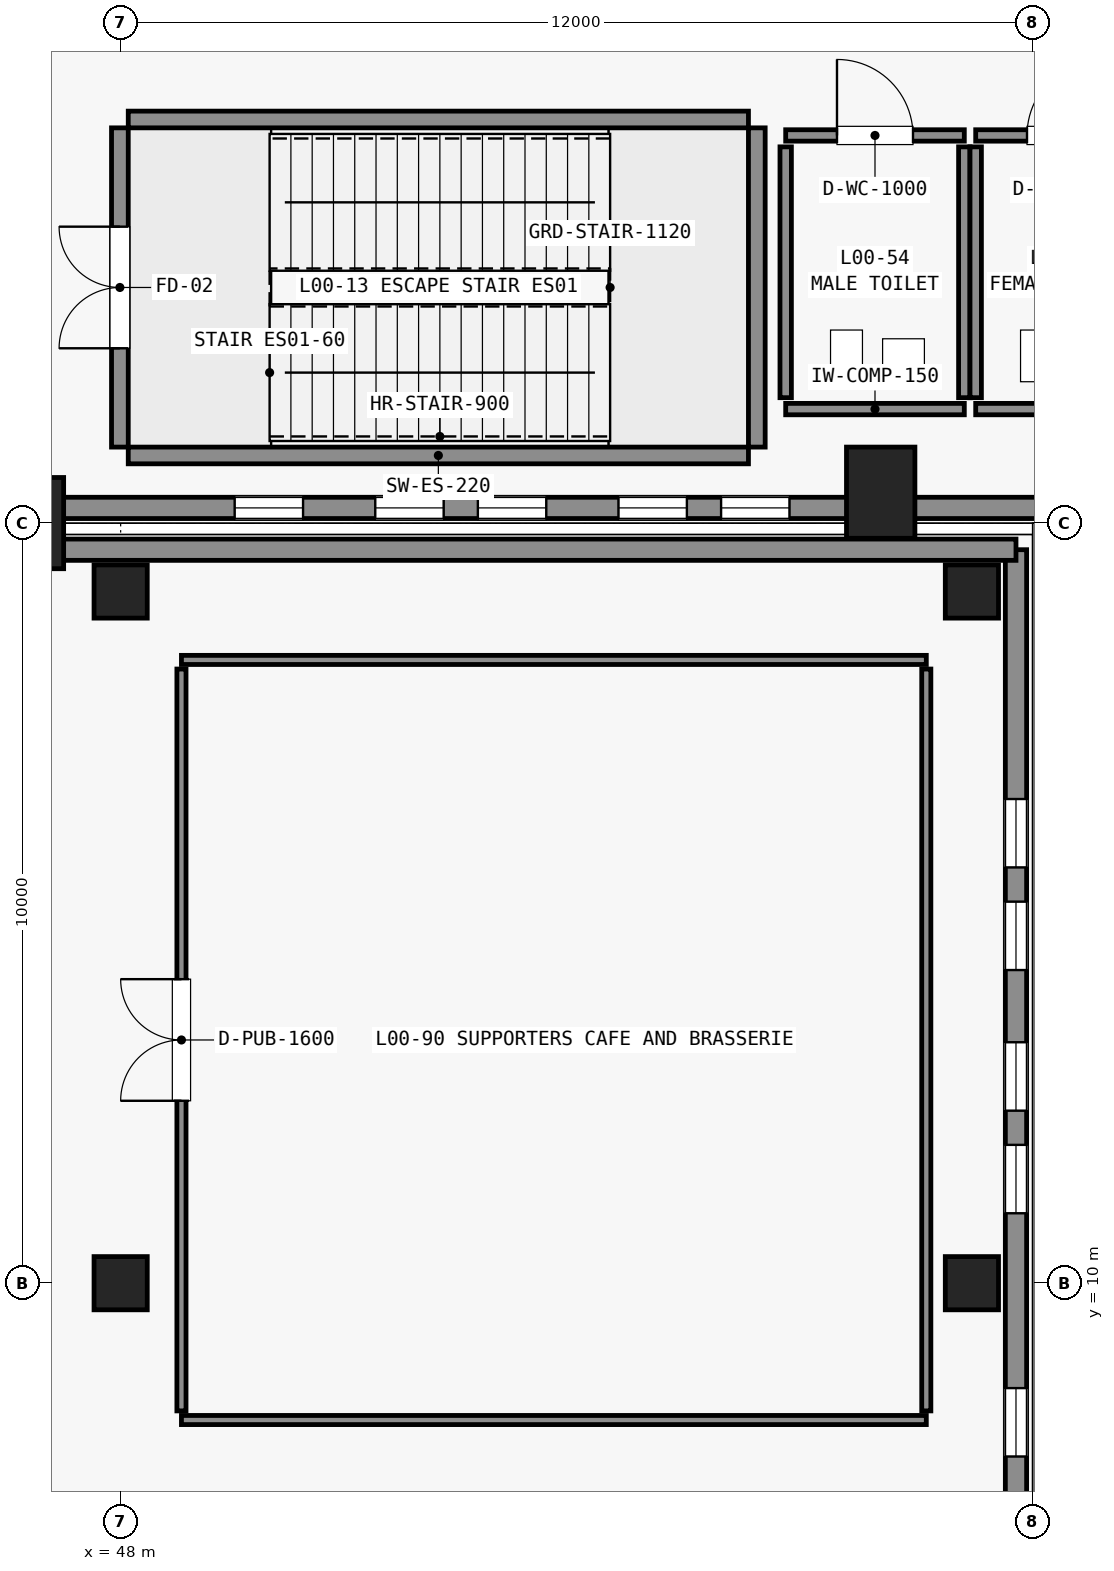
"""IFC4 building model, lengths in metres.
Left out: names, types, materials, properties, quantities, classifications, styles, units other than length and angle.
Written with IfcOpenShell. Run it as: python <this file> out.ifc"""

import sys

from ifc_helpers import new_model, si_unit, direction, frame, frame_2d, origin, origin_2d, place, context, subcontext, project, spatial, rectangle, extrude, element, fill, save


model = new_model("IFC4")
c1 = context("Model", 3, precision=1e-05, world=origin(), true_north=direction((0.0, 1.0)))
c2 = subcontext(c1, "Body", "Model", "MODEL_VIEW")
j1 = project(units=[si_unit("LENGTHUNIT", "METRE"), si_unit("PLANEANGLEUNIT", "RADIAN")], contexts=[c1])
p1 = place(None, origin())
s1 = spatial("IfcSite", under=j1, at=p1, CompositionType="ELEMENT")
p2 = place(p1, origin())
s2 = spatial("IfcBuilding", under=s1, at=p2, CompositionType="ELEMENT")
p3 = place(p2, origin())
s3 = spatial("IfcBuildingStorey", under=s2, at=p3, CompositionType="ELEMENT", Elevation=0.0)
p4 = place(p3, frame((58.0, 20.4, 0.0), z_axis=(0.0, 0.0, 1.0), x_axis=(1.0, 0.0, 0.0)))
e1 = element("IfcColumn", 1, at=p4, inside=s3, PredefinedType="PILASTER", context=c2, shape_type="SweptSolid", body=[
    extrude(rectangle(XDim=0.9, YDim=1.2, at=origin_2d()), origin(), (0.0, 0.0, 1.0), 6.0),
])
p5 = place(p3, frame((46.8, 20.0, -0.45), z_axis=(0.0, 0.0, 1.0), x_axis=(1.0, 0.0, 0.0)))
e2 = element("IfcColumn", 2, at=p5, inside=s3, PredefinedType="PILASTER", context=c2, shape_type="SweptSolid", body=[
    extrude(rectangle(XDim=0.9, YDim=1.2, at=origin_2d()), origin(), (0.0, 0.0, 1.0), 6.45),
])
for number, where, z_axis, x_axis in (
    (3, (48.0, 10.0, -0.45), (0.0, 0.0, 1.0), (1.0, 0.0, 0.0)),
    (4, (48.0, 19.1, -0.45), (0.0, 0.0, 1.0), (1.0, 0.0, 0.0)),
    (5, (59.2, 10.0, -0.45), (0.0, 0.0, 1.0), (1.0, 0.0, 0.0)),
    (6, (59.2, 19.1, -0.45), (0.0, 0.0, 1.0), (1.0, 0.0, 0.0)),
):
    element("IfcColumn", number, at=place(p3, frame(where, z_axis=z_axis, x_axis=x_axis)), inside=s3, PredefinedType="COLUMN", context=c2, shape_type="SweptSolid", body=[
        extrude(rectangle(XDim=0.7, YDim=0.7, at=origin_2d()), origin(), (0.0, 0.0, 1.0), 6.45),
    ])
p6 = place(p3, frame((47.05, 20.2, 0.0), z_axis=(0.0, 0.0, 1.0), x_axis=(1.0, 0.0, 0.0)))
e7 = element("IfcWall", 7, at=p6, inside=s3, PredefinedType="STANDARD", context=c2, shape_type="SweptSolid", body=[
    extrude(rectangle(XDim=26.93, YDim=0.28, at=frame_2d((13.465, 0.0))), origin(), (0.0, 0.0, 1.0), 5.64),
])
p7 = place(p6, frame((18.8, 0.0, 0.0)))
e8 = element("IfcOpeningElement", 8, at=p7, cuts=e7, PredefinedType="OPENING", context=c2, shape_type="SweptSolid", body=[
    extrude(rectangle(XDim=2.4, YDim=2.5, at=frame_2d((1.2, 1.25))), frame((0.0, 0.15, 0.0), z_axis=(0.0, -1.0, 0.0), x_axis=(1.0, 0.0, 0.0)), (0.0, 0.0, 1.0), 0.3),
])
p8 = place(p6, frame((2.45, 0.0, 0.95)))
e9 = element("IfcOpeningElement", 9, at=p8, cuts=e7, PredefinedType="OPENING", context=c2, shape_type="SweptSolid", body=[
    extrude(rectangle(XDim=0.9, YDim=2.85, at=frame_2d((0.45, 1.425))), frame((0.0, 0.15, 0.0), z_axis=(0.0, -1.0, 0.0), x_axis=(1.0, 0.0, 0.0)), (0.0, 0.0, 1.0), 0.3),
])
p9 = place(p6, frame((4.3, 0.0, 0.95)))
e10 = element("IfcOpeningElement", 10, at=p9, cuts=e7, PredefinedType="OPENING", context=c2, shape_type="SweptSolid", body=[
    extrude(rectangle(XDim=0.9, YDim=2.85, at=frame_2d((0.45, 1.425))), frame((0.0, 0.15, 0.0), z_axis=(0.0, -1.0, 0.0), x_axis=(1.0, 0.0, 0.0)), (0.0, 0.0, 1.0), 0.3),
])
p10 = place(p6, frame((5.65, 0.0, 0.95)))
e11 = element("IfcOpeningElement", 11, at=p10, cuts=e7, PredefinedType="OPENING", context=c2, shape_type="SweptSolid", body=[
    extrude(rectangle(XDim=0.9, YDim=2.85, at=frame_2d((0.45, 1.425))), frame((0.0, 0.15, 0.0), z_axis=(0.0, -1.0, 0.0), x_axis=(1.0, 0.0, 0.0)), (0.0, 0.0, 1.0), 0.3),
])
p11 = place(p6, frame((7.5, 0.0, 0.95)))
e12 = element("IfcOpeningElement", 12, at=p11, cuts=e7, PredefinedType="OPENING", context=c2, shape_type="SweptSolid", body=[
    extrude(rectangle(XDim=0.9, YDim=2.85, at=frame_2d((0.45, 1.425))), frame((0.0, 0.15, 0.0), z_axis=(0.0, -1.0, 0.0), x_axis=(1.0, 0.0, 0.0)), (0.0, 0.0, 1.0), 0.3),
])
p12 = place(p6, frame((8.85, 0.0, 0.95)))
e13 = element("IfcOpeningElement", 13, at=p12, cuts=e7, PredefinedType="OPENING", context=c2, shape_type="SweptSolid", body=[
    extrude(rectangle(XDim=0.9, YDim=2.85, at=frame_2d((0.45, 1.425))), frame((0.0, 0.15, 0.0), z_axis=(0.0, -1.0, 0.0), x_axis=(1.0, 0.0, 0.0)), (0.0, 0.0, 1.0), 0.3),
])
p13 = place(p6, frame((13.9, 0.0, 0.95)))
e14 = element("IfcOpeningElement", 14, at=p13, cuts=e7, PredefinedType="OPENING", context=c2, shape_type="SweptSolid", body=[
    extrude(rectangle(XDim=0.9, YDim=2.85, at=frame_2d((0.45, 1.425))), frame((0.0, 0.15, 0.0), z_axis=(0.0, -1.0, 0.0), x_axis=(1.0, 0.0, 0.0)), (0.0, 0.0, 1.0), 0.3),
])
p14 = place(p6, frame((15.25, 0.0, 0.95)))
e15 = element("IfcOpeningElement", 15, at=p14, cuts=e7, PredefinedType="OPENING", context=c2, shape_type="SweptSolid", body=[
    extrude(rectangle(XDim=0.9, YDim=2.85, at=frame_2d((0.45, 1.425))), frame((0.0, 0.15, 0.0), z_axis=(0.0, -1.0, 0.0), x_axis=(1.0, 0.0, 0.0)), (0.0, 0.0, 1.0), 0.3),
])
p15 = place(p6, frame((17.1, 0.0, 0.95)))
e16 = element("IfcOpeningElement", 16, at=p15, cuts=e7, PredefinedType="OPENING", context=c2, shape_type="SweptSolid", body=[
    extrude(rectangle(XDim=0.9, YDim=2.85, at=frame_2d((0.45, 1.425))), frame((0.0, 0.15, 0.0), z_axis=(0.0, -1.0, 0.0), x_axis=(1.0, 0.0, 0.0)), (0.0, 0.0, 1.0), 0.3),
])
p16 = place(p6, frame((24.85, 0.0, 0.95)))
e17 = element("IfcOpeningElement", 17, at=p16, cuts=e7, PredefinedType="OPENING", context=c2, shape_type="SweptSolid", body=[
    extrude(rectangle(XDim=0.9, YDim=2.85, at=frame_2d((0.45, 1.425))), frame((0.0, 0.15, 0.0), z_axis=(0.0, -1.0, 0.0), x_axis=(1.0, 0.0, 0.0)), (0.0, 0.0, 1.0), 0.3),
])
p17 = place(p3, frame((59.78, 0.22, 0.0), z_axis=(0.0, 0.0, 1.0), x_axis=(0.0, 1.0, 0.0)))
e18 = element("IfcWall", 18, at=p17, inside=s3, PredefinedType="STANDARD", context=c2, shape_type="SweptSolid", body=[
    extrude(rectangle(XDim=19.43, YDim=0.28, at=frame_2d((9.715, 0.0))), origin(), (0.0, 0.0, 1.0), 5.64),
])
p18 = place(p17, frame((2.45, 0.0, 0.95)))
e19 = element("IfcOpeningElement", 19, at=p18, cuts=e18, PredefinedType="OPENING", context=c2, shape_type="SweptSolid", body=[
    extrude(rectangle(XDim=0.9, YDim=2.85, at=frame_2d((0.45, 1.425))), frame((0.0, 0.15, 0.0), z_axis=(0.0, -1.0, 0.0), x_axis=(1.0, 0.0, 0.0)), (0.0, 0.0, 1.0), 0.3),
])
p19 = place(p17, frame((4.3, 0.0, 0.95)))
e20 = element("IfcOpeningElement", 20, at=p19, cuts=e18, PredefinedType="OPENING", context=c2, shape_type="SweptSolid", body=[
    extrude(rectangle(XDim=0.9, YDim=2.85, at=frame_2d((0.45, 1.425))), frame((0.0, 0.15, 0.0), z_axis=(0.0, -1.0, 0.0), x_axis=(1.0, 0.0, 0.0)), (0.0, 0.0, 1.0), 0.3),
])
p20 = place(p17, frame((5.65, 0.0, 0.95)))
e21 = element("IfcOpeningElement", 21, at=p20, cuts=e18, PredefinedType="OPENING", context=c2, shape_type="SweptSolid", body=[
    extrude(rectangle(XDim=0.9, YDim=2.85, at=frame_2d((0.45, 1.425))), frame((0.0, 0.15, 0.0), z_axis=(0.0, -1.0, 0.0), x_axis=(1.0, 0.0, 0.0)), (0.0, 0.0, 1.0), 0.3),
])
p21 = place(p17, frame((7.5, 0.0, 0.95)))
e22 = element("IfcOpeningElement", 22, at=p21, cuts=e18, PredefinedType="OPENING", context=c2, shape_type="SweptSolid", body=[
    extrude(rectangle(XDim=0.9, YDim=2.85, at=frame_2d((0.45, 1.425))), frame((0.0, 0.15, 0.0), z_axis=(0.0, -1.0, 0.0), x_axis=(1.0, 0.0, 0.0)), (0.0, 0.0, 1.0), 0.3),
])
p22 = place(p17, frame((10.7, 0.0, 0.95)))
e23 = element("IfcOpeningElement", 23, at=p22, cuts=e18, PredefinedType="OPENING", context=c2, shape_type="SweptSolid", body=[
    extrude(rectangle(XDim=0.9, YDim=2.85, at=frame_2d((0.45, 1.425))), frame((0.0, 0.15, 0.0), z_axis=(0.0, -1.0, 0.0), x_axis=(1.0, 0.0, 0.0)), (0.0, 0.0, 1.0), 0.3),
])
p23 = place(p17, frame((12.05, 0.0, 0.95)))
e24 = element("IfcOpeningElement", 24, at=p23, cuts=e18, PredefinedType="OPENING", context=c2, shape_type="SweptSolid", body=[
    extrude(rectangle(XDim=0.9, YDim=2.85, at=frame_2d((0.45, 1.425))), frame((0.0, 0.15, 0.0), z_axis=(0.0, -1.0, 0.0), x_axis=(1.0, 0.0, 0.0)), (0.0, 0.0, 1.0), 0.3),
])
p24 = place(p17, frame((13.9, 0.0, 0.95)))
e25 = element("IfcOpeningElement", 25, at=p24, cuts=e18, PredefinedType="OPENING", context=c2, shape_type="SweptSolid", body=[
    extrude(rectangle(XDim=0.9, YDim=2.85, at=frame_2d((0.45, 1.425))), frame((0.0, 0.15, 0.0), z_axis=(0.0, -1.0, 0.0), x_axis=(1.0, 0.0, 0.0)), (0.0, 0.0, 1.0), 0.3),
])
p25 = place(p17, frame((15.25, 0.0, 0.95)))
e26 = element("IfcOpeningElement", 26, at=p25, cuts=e18, PredefinedType="OPENING", context=c2, shape_type="SweptSolid", body=[
    extrude(rectangle(XDim=0.9, YDim=2.85, at=frame_2d((0.45, 1.425))), frame((0.0, 0.15, 0.0), z_axis=(0.0, -1.0, 0.0), x_axis=(1.0, 0.0, 0.0)), (0.0, 0.0, 1.0), 0.3),
])
p26 = place(p3, frame((47.05, 19.65, 0.0), z_axis=(0.0, 0.0, 1.0), x_axis=(1.0, 0.0, 0.0)))
e27 = element("IfcWall", 27, at=p26, inside=s3, PredefinedType="STANDARD", context=c2, shape_type="SweptSolid", body=[
    extrude(rectangle(XDim=12.73, YDim=0.28, at=frame_2d((6.365, 0.0))), origin(), (0.0, 0.0, 1.0), 5.64),
])
for number, where, z_axis, x_axis in (
    (28, (48.1, 20.89, 0.0), (0.0, 0.0, 1.0), (1.0, 0.0, 0.0)),
    (29, (48.1, 25.31, 0.0), (0.0, 0.0, 1.0), (1.0, 0.0, 0.0)),
):
    element("IfcWall", number, at=place(p3, frame(where, z_axis=z_axis, x_axis=x_axis)), inside=s3, PredefinedType="SHEAR", context=c2, shape_type="SweptSolid", body=[
        extrude(rectangle(XDim=8.16, YDim=0.22, at=frame_2d((4.08, 0.0))), origin(), (0.0, 0.0, 1.0), 6.0),
    ])
p27 = place(p3, frame((47.99, 21.0, 0.0), z_axis=(0.0, 0.0, 1.0), x_axis=(0.0, 1.0, 0.0)))
e30 = element("IfcWall", 30, at=p27, inside=s3, PredefinedType="SHEAR", context=c2, shape_type="SweptSolid", body=[
    extrude(rectangle(XDim=4.2, YDim=0.22, at=frame_2d((2.1, 0.0))), origin(), (0.0, 0.0, 1.0), 6.0),
])
p28 = place(p27, frame((1.3, 0.0, 0.0)))
e31 = element("IfcOpeningElement", 31, at=p28, cuts=e30, PredefinedType="OPENING", context=c2, shape_type="SweptSolid", body=[
    extrude(rectangle(XDim=1.6, YDim=2.2, at=frame_2d((0.8, 1.1))), frame((0.0, 0.12, 0.0), z_axis=(0.0, -1.0, 0.0), x_axis=(1.0, 0.0, 0.0)), (0.0, 0.0, 1.0), 0.24),
])
p29 = place(p3, frame((56.37, 21.0, 0.0), z_axis=(0.0, 0.0, 1.0), x_axis=(0.0, 1.0, 0.0)))
e32 = element("IfcWall", 32, at=p29, inside=s3, PredefinedType="SHEAR", context=c2, shape_type="SweptSolid", body=[
    extrude(rectangle(XDim=4.2, YDim=0.22, at=frame_2d((2.1, 0.0))), origin(), (0.0, 0.0, 1.0), 6.0),
])
p30 = place(p3, frame((56.75, 21.5, 0.0), z_axis=(0.0, 0.0, 1.0), x_axis=(1.0, 0.0, 0.0)))
e33 = element("IfcWall", 33, at=p30, inside=s3, PredefinedType="STANDARD", context=c2, shape_type="SweptSolid", body=[
    extrude(rectangle(XDim=2.35, YDim=0.15, at=frame_2d((1.175, 0.0))), origin(), (0.0, 0.0, 1.0), 5.64),
])
p31 = place(p3, frame((56.75, 25.1, 0.0), z_axis=(0.0, 0.0, 1.0), x_axis=(1.0, 0.0, 0.0)))
e34 = element("IfcWall", 34, at=p31, inside=s3, PredefinedType="STANDARD", context=c2, shape_type="SweptSolid", body=[
    extrude(rectangle(XDim=2.35, YDim=0.15, at=frame_2d((1.175, 0.0))), origin(), (0.0, 0.0, 1.0), 5.64),
])
p32 = place(p31, frame((0.675, 0.0, 0.0)))
e35 = element("IfcOpeningElement", 35, at=p32, cuts=e34, PredefinedType="OPENING", context=c2, shape_type="SweptSolid", body=[
    extrude(rectangle(XDim=1.0, YDim=2.15, at=frame_2d((0.5, 1.075))), frame((0.0, 0.085, 0.0), z_axis=(0.0, -1.0, 0.0), x_axis=(1.0, 0.0, 0.0)), (0.0, 0.0, 1.0), 0.17),
])
for number, where, z_axis, x_axis in (
    (36, (56.75, 21.65, 0.0), (0.0, 0.0, 1.0), (0.0, 1.0, 0.0)),
    (37, (59.1, 21.65, 0.0), (0.0, 0.0, 1.0), (0.0, 1.0, 0.0)),
):
    element("IfcWall", number, at=place(p3, frame(where, z_axis=z_axis, x_axis=x_axis)), inside=s3, PredefinedType="STANDARD", context=c2, shape_type="SweptSolid", body=[
        extrude(rectangle(XDim=3.3, YDim=0.15, at=frame_2d((1.65, 0.0))), origin(), (0.0, 0.0, 1.0), 5.64),
    ])
p33 = place(p3, frame((59.25, 21.5, 0.0), z_axis=(0.0, 0.0, 1.0), x_axis=(1.0, 0.0, 0.0)))
e38 = element("IfcWall", 38, at=p33, inside=s3, PredefinedType="STANDARD", context=c2, shape_type="SweptSolid", body=[
    extrude(rectangle(XDim=2.35, YDim=0.15, at=frame_2d((1.175, 0.0))), origin(), (0.0, 0.0, 1.0), 5.64),
])
p34 = place(p3, frame((59.25, 25.1, 0.0), z_axis=(0.0, 0.0, 1.0), x_axis=(1.0, 0.0, 0.0)))
e39 = element("IfcWall", 39, at=p34, inside=s3, PredefinedType="STANDARD", context=c2, shape_type="SweptSolid", body=[
    extrude(rectangle(XDim=2.35, YDim=0.15, at=frame_2d((1.175, 0.0))), origin(), (0.0, 0.0, 1.0), 5.64),
])
p35 = place(p34, frame((0.675, 0.0, 0.0)))
e40 = element("IfcOpeningElement", 40, at=p35, cuts=e39, PredefinedType="OPENING", context=c2, shape_type="SweptSolid", body=[
    extrude(rectangle(XDim=1.0, YDim=2.15, at=frame_2d((0.5, 1.075))), frame((0.0, 0.085, 0.0), z_axis=(0.0, -1.0, 0.0), x_axis=(1.0, 0.0, 0.0)), (0.0, 0.0, 1.0), 0.17),
])
p36 = place(p3, frame((59.25, 21.65, 0.0), z_axis=(0.0, 0.0, 1.0), x_axis=(0.0, 1.0, 0.0)))
e41 = element("IfcWall", 41, at=p36, inside=s3, PredefinedType="STANDARD", context=c2, shape_type="SweptSolid", body=[
    extrude(rectangle(XDim=3.3, YDim=0.15, at=frame_2d((1.65, 0.0))), origin(), (0.0, 0.0, 1.0), 5.64),
])
for number, where, z_axis, x_axis in (
    (42, (48.8, 8.2, 0.0), (0.0, 0.0, 1.0), (1.0, 0.0, 0.0)),
    (43, (48.8, 18.2, 0.0), (0.0, 0.0, 1.0), (1.0, 0.0, 0.0)),
):
    element("IfcWall", number, at=place(p3, frame(where, z_axis=z_axis, x_axis=x_axis)), inside=s3, PredefinedType="PARTITIONING", context=c2, shape_type="SweptSolid", body=[
        extrude(rectangle(XDim=9.8, YDim=0.12, at=frame_2d((4.9, 0.0))), origin(), (0.0, 0.0, 1.0), 4.89),
    ])
p37 = place(p3, frame((48.8, 8.32, 0.0), z_axis=(0.0, 0.0, 1.0), x_axis=(0.0, 1.0, 0.0)))
e44 = element("IfcWall", 44, at=p37, inside=s3, PredefinedType="PARTITIONING", context=c2, shape_type="SweptSolid", body=[
    extrude(rectangle(XDim=9.76, YDim=0.12, at=frame_2d((4.88, 0.0))), origin(), (0.0, 0.0, 1.0), 4.89),
])
p38 = place(p37, frame((4.08, 0.0, 0.0)))
e45 = element("IfcOpeningElement", 45, at=p38, cuts=e44, PredefinedType="OPENING", context=c2, shape_type="SweptSolid", body=[
    extrude(rectangle(XDim=1.6, YDim=2.25, at=frame_2d((0.8, 1.125))), frame((0.0, 0.07, 0.0), z_axis=(0.0, -1.0, 0.0), x_axis=(1.0, 0.0, 0.0)), (0.0, 0.0, 1.0), 0.14),
])
p39 = place(p3, frame((58.6, 8.32, 0.0), z_axis=(0.0, 0.0, 1.0), x_axis=(0.0, 1.0, 0.0)))
e46 = element("IfcWall", 46, at=p39, inside=s3, PredefinedType="PARTITIONING", context=c2, shape_type="SweptSolid", body=[
    extrude(rectangle(XDim=9.76, YDim=0.12, at=frame_2d((4.88, 0.0))), origin(), (0.0, 0.0, 1.0), 4.89),
])
p40 = place(p8, origin())
e47 = element("IfcWindow", 47, at=p40, inside=s3, PartitioningType="DOUBLE_PANEL_VERTICAL", PredefinedType="WINDOW", context=c2, shape_type="SweptSolid", body=[
    extrude(rectangle(XDim=0.9, YDim=2.85, at=frame_2d((0.45, 1.425))), frame((0.0, 0.03, 0.0), z_axis=(0.0, -1.0, 0.0), x_axis=(1.0, 0.0, 0.0)), (0.0, 0.0, 1.0), 0.06),
])
fill(e9, e47)
p41 = place(p9, origin())
e48 = element("IfcWindow", 48, at=p41, inside=s3, PartitioningType="DOUBLE_PANEL_VERTICAL", PredefinedType="WINDOW", context=c2, shape_type="SweptSolid", body=[
    extrude(rectangle(XDim=0.9, YDim=2.85, at=frame_2d((0.45, 1.425))), frame((0.0, 0.03, 0.0), z_axis=(0.0, -1.0, 0.0), x_axis=(1.0, 0.0, 0.0)), (0.0, 0.0, 1.0), 0.06),
])
fill(e10, e48)
p42 = place(p10, origin())
e49 = element("IfcWindow", 49, at=p42, inside=s3, PartitioningType="DOUBLE_PANEL_VERTICAL", PredefinedType="WINDOW", context=c2, shape_type="SweptSolid", body=[
    extrude(rectangle(XDim=0.9, YDim=2.85, at=frame_2d((0.45, 1.425))), frame((0.0, 0.03, 0.0), z_axis=(0.0, -1.0, 0.0), x_axis=(1.0, 0.0, 0.0)), (0.0, 0.0, 1.0), 0.06),
])
fill(e11, e49)
p43 = place(p11, origin())
e50 = element("IfcWindow", 50, at=p43, inside=s3, PartitioningType="DOUBLE_PANEL_VERTICAL", PredefinedType="WINDOW", context=c2, shape_type="SweptSolid", body=[
    extrude(rectangle(XDim=0.9, YDim=2.85, at=frame_2d((0.45, 1.425))), frame((0.0, 0.03, 0.0), z_axis=(0.0, -1.0, 0.0), x_axis=(1.0, 0.0, 0.0)), (0.0, 0.0, 1.0), 0.06),
])
fill(e12, e50)
p44 = place(p12, origin())
e51 = element("IfcWindow", 51, at=p44, inside=s3, PartitioningType="DOUBLE_PANEL_VERTICAL", PredefinedType="WINDOW", context=c2, shape_type="SweptSolid", body=[
    extrude(rectangle(XDim=0.9, YDim=2.85, at=frame_2d((0.45, 1.425))), frame((0.0, 0.03, 0.0), z_axis=(0.0, -1.0, 0.0), x_axis=(1.0, 0.0, 0.0)), (0.0, 0.0, 1.0), 0.06),
])
fill(e13, e51)
p45 = place(p21, origin())
e52 = element("IfcWindow", 52, at=p45, inside=s3, PartitioningType="DOUBLE_PANEL_VERTICAL", PredefinedType="WINDOW", context=c2, shape_type="SweptSolid", body=[
    extrude(rectangle(XDim=0.9, YDim=2.85, at=frame_2d((0.45, 1.425))), frame((0.0, 0.03, 0.0), z_axis=(0.0, -1.0, 0.0), x_axis=(1.0, 0.0, 0.0)), (0.0, 0.0, 1.0), 0.06),
])
fill(e22, e52)
p46 = place(p22, origin())
e53 = element("IfcWindow", 53, at=p46, inside=s3, PartitioningType="DOUBLE_PANEL_VERTICAL", PredefinedType="WINDOW", context=c2, shape_type="SweptSolid", body=[
    extrude(rectangle(XDim=0.9, YDim=2.85, at=frame_2d((0.45, 1.425))), frame((0.0, 0.03, 0.0), z_axis=(0.0, -1.0, 0.0), x_axis=(1.0, 0.0, 0.0)), (0.0, 0.0, 1.0), 0.06),
])
fill(e23, e53)
p47 = place(p23, origin())
e54 = element("IfcWindow", 54, at=p47, inside=s3, PartitioningType="DOUBLE_PANEL_VERTICAL", PredefinedType="WINDOW", context=c2, shape_type="SweptSolid", body=[
    extrude(rectangle(XDim=0.9, YDim=2.85, at=frame_2d((0.45, 1.425))), frame((0.0, 0.03, 0.0), z_axis=(0.0, -1.0, 0.0), x_axis=(1.0, 0.0, 0.0)), (0.0, 0.0, 1.0), 0.06),
])
fill(e24, e54)
p48 = place(p24, origin())
e55 = element("IfcWindow", 55, at=p48, inside=s3, PartitioningType="DOUBLE_PANEL_VERTICAL", PredefinedType="WINDOW", context=c2, shape_type="SweptSolid", body=[
    extrude(rectangle(XDim=0.9, YDim=2.85, at=frame_2d((0.45, 1.425))), frame((0.0, 0.03, 0.0), z_axis=(0.0, -1.0, 0.0), x_axis=(1.0, 0.0, 0.0)), (0.0, 0.0, 1.0), 0.06),
])
fill(e25, e55)
p49 = place(p25, origin())
e56 = element("IfcWindow", 56, at=p49, inside=s3, PartitioningType="DOUBLE_PANEL_VERTICAL", PredefinedType="WINDOW", context=c2, shape_type="SweptSolid", body=[
    extrude(rectangle(XDim=0.9, YDim=2.85, at=frame_2d((0.45, 1.425))), frame((0.0, 0.03, 0.0), z_axis=(0.0, -1.0, 0.0), x_axis=(1.0, 0.0, 0.0)), (0.0, 0.0, 1.0), 0.06),
])
fill(e26, e56)
p50 = place(p28, origin())
e57 = element("IfcDoor", 57, at=p50, inside=s3, OperationType="DOUBLE_DOOR_SINGLE_SWING", PredefinedType="DOOR", context=c2, shape_type="SweptSolid", body=[
    extrude(rectangle(XDim=1.6, YDim=2.2, at=frame_2d((0.8, 1.1))), frame((0.0, 0.025, 0.0), z_axis=(0.0, -1.0, 0.0), x_axis=(1.0, 0.0, 0.0)), (0.0, 0.0, 1.0), 0.05),
])
fill(e31, e57)
p51 = place(p32, origin())
e58 = element("IfcDoor", 58, at=p51, inside=s3, OperationType="SINGLE_SWING_LEFT", PredefinedType="DOOR", context=c2, shape_type="SweptSolid", body=[
    extrude(rectangle(XDim=1.0, YDim=2.15, at=frame_2d((0.5, 1.075))), frame((0.0, 0.025, 0.0), z_axis=(0.0, -1.0, 0.0), x_axis=(1.0, 0.0, 0.0)), (0.0, 0.0, 1.0), 0.05),
])
fill(e35, e58)
p52 = place(p35, origin())
e59 = element("IfcDoor", 59, at=p52, inside=s3, OperationType="SINGLE_SWING_RIGHT", PredefinedType="DOOR", context=c2, shape_type="SweptSolid", body=[
    extrude(rectangle(XDim=1.0, YDim=2.15, at=frame_2d((0.5, 1.075))), frame((0.0, 0.025, 0.0), z_axis=(0.0, -1.0, 0.0), x_axis=(1.0, 0.0, 0.0)), (0.0, 0.0, 1.0), 0.05),
])
fill(e40, e59)
p53 = place(p38, origin())
e60 = element("IfcDoor", 60, at=p53, inside=s3, OperationType="DOUBLE_DOOR_SINGLE_SWING", PredefinedType="DOOR", context=c2, shape_type="SweptSolid", body=[
    extrude(rectangle(XDim=1.6, YDim=2.25, at=frame_2d((0.8, 1.125))), frame((0.0, 0.025, 0.0), z_axis=(0.0, -1.0, 0.0), x_axis=(1.0, 0.0, 0.0)), (0.0, 0.0, 1.0), 0.05),
])
fill(e45, e60)
save(model, sys.argv[1])
